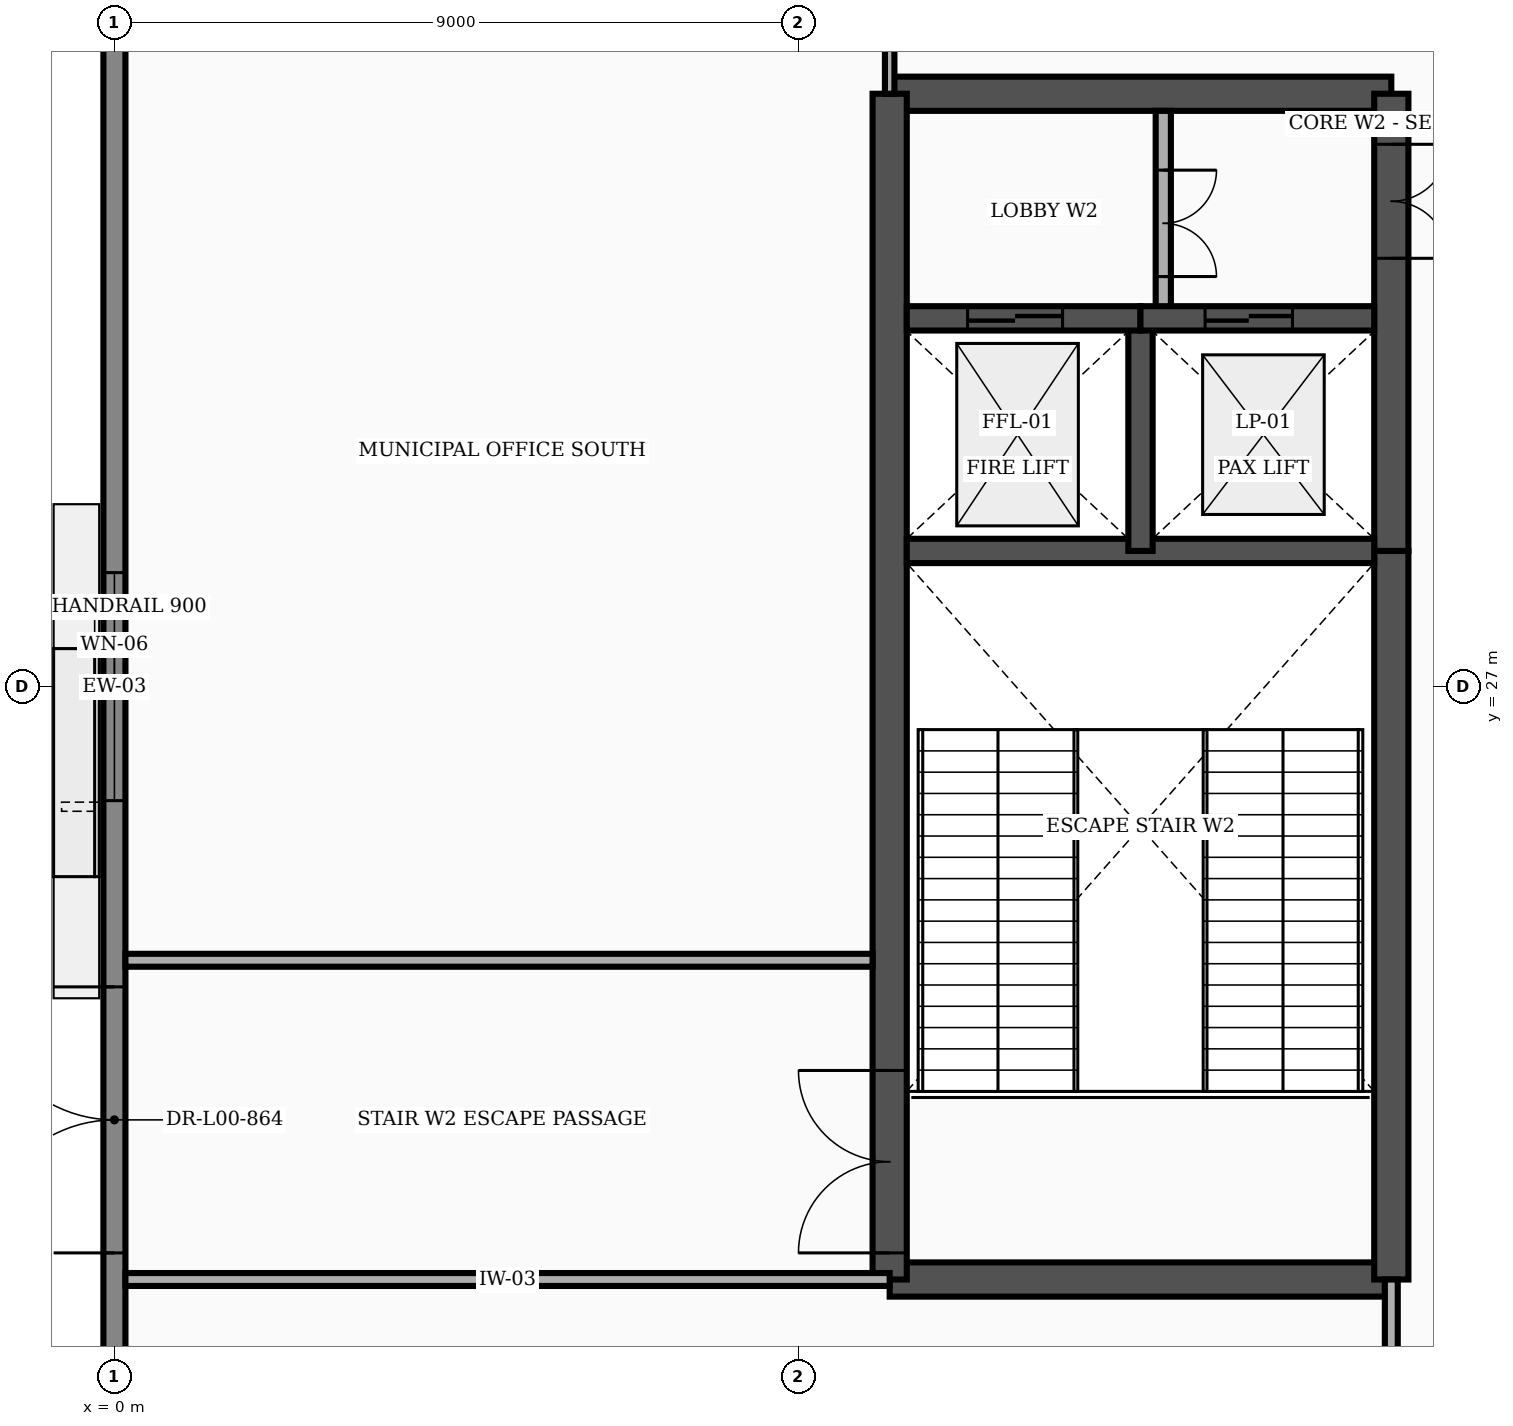
"""IFC4 building model, lengths in metres.
Left out: names, types, materials, properties, quantities, classifications, styles, units other than length and angle.
Written with IfcOpenShell. Run it as: python <this file> out.ifc"""

import sys

from ifc_helpers import new_model, si_unit, direction, frame, frame_2d, origin, place, context, subcontext, project, spatial, rectangle, extrude, element, fill, save


model = new_model("IFC4")
c1 = context("Model", 3, precision=1e-05, world=origin(), true_north=direction((0.0, 1.0)))
c2 = subcontext(c1, "Body", "Model", "MODEL_VIEW")
j1 = project(units=[si_unit("LENGTHUNIT", "METRE"), si_unit("PLANEANGLEUNIT", "RADIAN")], contexts=[c1])
p1 = place(None, origin())
s1 = spatial("IfcSite", under=j1, at=p1, CompositionType="ELEMENT")
p2 = place(p1, origin())
s2 = spatial("IfcBuilding", under=s1, at=p2, CompositionType="ELEMENT")
p3 = place(p2, origin())
s3 = spatial("IfcBuildingStorey", under=s2, at=p3, CompositionType="ELEMENT", Elevation=0.0)
p4 = place(p3, frame((0.0, 18.198, 0.0), z_axis=(0.0, 0.0, 1.0), x_axis=(0.0, 1.0, 0.0)))
e1 = element("IfcWall", 1, at=p4, inside=s3, PredefinedType="STANDARD", context=c2, shape_type="SweptSolid", body=[
    extrude(rectangle(XDim=17.603, YDim=0.29, at=frame_2d((8.802, 0.0))), origin(), (0.0, 0.0, 1.0), 5.066),
])
p5 = place(p4, frame((1.352, 0.0, 0.0)))
e2 = element("IfcOpeningElement", 2, at=p5, cuts=e1, PredefinedType="OPENING", context=c2, shape_type="SweptSolid", body=[
    extrude(rectangle(XDim=3.5, YDim=2.4, at=frame_2d((1.75, 1.2))), frame((0.0, 0.157, 0.0), z_axis=(0.0, -1.0, 0.0), x_axis=(1.0, 0.0, 0.0)), (0.0, 0.0, 1.0), 0.314),
])
p6 = place(p4, frame((7.302, 0.0, 0.85)))
e3 = element("IfcOpeningElement", 3, at=p6, cuts=e1, PredefinedType="OPENING", context=c2, shape_type="SweptSolid", body=[
    extrude(rectangle(XDim=3.0, YDim=2.6, at=frame_2d((1.5, 1.3))), frame((0.0, 0.157, 0.0), z_axis=(0.0, -1.0, 0.0), x_axis=(1.0, 0.0, 0.0)), (0.0, 0.0, 1.0), 0.314),
])
for number, where, z_axis, x_axis in (
    (4, (10.2, 19.2, 0.0), (0.0, 0.0, 1.0), (1.0, 0.0, 0.0)),
    (5, (10.2, 34.8, 0.0), (0.0, 0.0, 1.0), (1.0, 0.0, 0.0)),
):
    element("IfcWall", number, at=place(p3, frame(where, z_axis=z_axis, x_axis=x_axis)), inside=s3, PredefinedType="SHEAR", context=c2, shape_type="SweptSolid", body=[
        extrude(rectangle(XDim=6.6, YDim=0.45, at=frame_2d((3.3, 0.0))), origin(), (0.0, 0.0, 1.0), 5.75),
    ])
p7 = place(p3, frame((10.2, 19.2, 0.0), z_axis=(0.0, 0.0, 1.0), x_axis=(0.0, 1.0, 0.0)))
e6 = element("IfcWall", 6, at=p7, inside=s3, PredefinedType="SHEAR", context=c2, shape_type="SweptSolid", body=[
    extrude(rectangle(XDim=15.6, YDim=0.45, at=frame_2d((7.8, 0.0))), origin(), (0.0, 0.0, 1.0), 5.75),
])
p8 = place(p7, frame((0.35, 0.0, 0.0)))
e7 = element("IfcOpeningElement", 7, at=p8, cuts=e6, PredefinedType="OPENING", context=c2, shape_type="SweptSolid", body=[
    extrude(rectangle(XDim=2.4, YDim=2.25, at=frame_2d((1.2, 1.125))), frame((0.0, 0.237, 0.0), z_axis=(0.0, -1.0, 0.0), x_axis=(1.0, 0.0, 0.0)), (0.0, 0.0, 1.0), 0.474),
])
p9 = place(p3, frame((16.8, 19.2, 0.0), z_axis=(0.0, 0.0, 1.0), x_axis=(0.0, 1.0, 0.0)))
e8 = element("IfcWall", 8, at=p9, inside=s3, PredefinedType="SHEAR", context=c2, shape_type="SweptSolid", body=[
    extrude(rectangle(XDim=9.585, YDim=0.45, at=frame_2d((4.792, 0.0))), origin(), (0.0, 0.0, 1.0), 5.75),
])
p10 = place(p3, frame((16.8, 28.785, 0.0), z_axis=(0.0, 0.0, 1.0), x_axis=(0.0, 1.0, 0.0)))
e9 = element("IfcWall", 9, at=p10, inside=s3, PredefinedType="SHEAR", context=c2, shape_type="SweptSolid", body=[
    extrude(rectangle(XDim=6.015, YDim=0.45, at=frame_2d((3.008, 0.0))), origin(), (0.0, 0.0, 1.0), 5.75),
])
p11 = place(p10, frame((3.85, 0.0, 0.0)))
e10 = element("IfcOpeningElement", 10, at=p11, cuts=e9, PredefinedType="OPENING", context=c2, shape_type="SweptSolid", body=[
    extrude(rectangle(XDim=1.5, YDim=2.2, at=frame_2d((0.75, 1.1))), frame((0.0, 0.237, 0.0), z_axis=(0.0, -1.0, 0.0), x_axis=(1.0, 0.0, 0.0)), (0.0, 0.0, 1.0), 0.474),
])
p12 = place(p3, frame((10.425, 28.785, 0.0), z_axis=(0.0, 0.0, 1.0), x_axis=(1.0, 0.0, 0.0)))
e11 = element("IfcWall", 11, at=p12, inside=s3, PredefinedType="SHEAR", context=c2, shape_type="SweptSolid", body=[
    extrude(rectangle(XDim=6.15, YDim=0.32, at=frame_2d((3.075, 0.0))), origin(), (0.0, 0.0, 1.0), 5.75),
])
p13 = place(p3, frame((13.5, 28.785, 0.0), z_axis=(0.0, 0.0, 1.0), x_axis=(0.0, 1.0, 0.0)))
e12 = element("IfcWall", 12, at=p13, inside=s3, PredefinedType="SHEAR", context=c2, shape_type="SweptSolid", body=[
    extrude(rectangle(XDim=3.06, YDim=0.32, at=frame_2d((1.53, 0.0))), origin(), (0.0, 0.0, 1.0), 5.75),
])
p14 = place(p3, frame((13.8, 31.845, 0.0), z_axis=(0.0, 0.0, 1.0), x_axis=(0.0, 1.0, 0.0)))
e13 = element("IfcWall", 13, at=p14, inside=s3, PredefinedType="PARTITIONING", context=c2, shape_type="SweptSolid", body=[
    extrude(rectangle(XDim=2.73, YDim=0.2, at=frame_2d((1.365, 0.0))), origin(), (0.0, 0.0, 1.0), 5.75),
])
p15 = place(p14, frame((0.55, 0.0, 0.0)))
e14 = element("IfcOpeningElement", 14, at=p15, cuts=e13, PredefinedType="OPENING", context=c2, shape_type="SweptSolid", body=[
    extrude(rectangle(XDim=1.4, YDim=2.25, at=frame_2d((0.7, 1.125))), frame((0.0, 0.112, 0.0), z_axis=(0.0, -1.0, 0.0), x_axis=(1.0, 0.0, 0.0)), (0.0, 0.0, 1.0), 0.224),
])
p16 = place(p3, frame((10.425, 31.845, 0.0), z_axis=(0.0, 0.0, 1.0), x_axis=(1.0, 0.0, 0.0)))
e15 = element("IfcWall", 15, at=p16, inside=s3, PredefinedType="SHEAR", context=c2, shape_type="SweptSolid", body=[
    extrude(rectangle(XDim=3.075, YDim=0.32, at=frame_2d((1.538, 0.0))), origin(), (0.0, 0.0, 1.0), 5.75),
])
p17 = place(p16, frame((0.8, 0.0, 0.0)))
e16 = element("IfcOpeningElement", 16, at=p17, cuts=e15, PredefinedType="OPENING", context=c2, shape_type="SweptSolid", body=[
    extrude(rectangle(XDim=1.25, YDim=2.25, at=frame_2d((0.625, 1.125))), frame((0.0, 0.172, 0.0), z_axis=(0.0, -1.0, 0.0), x_axis=(1.0, 0.0, 0.0)), (0.0, 0.0, 1.0), 0.344),
])
p18 = place(p3, frame((13.5, 31.845, 0.0), z_axis=(0.0, 0.0, 1.0), x_axis=(1.0, 0.0, 0.0)))
e17 = element("IfcWall", 17, at=p18, inside=s3, PredefinedType="SHEAR", context=c2, shape_type="SweptSolid", body=[
    extrude(rectangle(XDim=3.075, YDim=0.32, at=frame_2d((1.538, 0.0))), origin(), (0.0, 0.0, 1.0), 5.75),
])
p19 = place(p18, frame((0.85, 0.0, 0.0)))
e18 = element("IfcOpeningElement", 18, at=p19, cuts=e17, PredefinedType="OPENING", context=c2, shape_type="SweptSolid", body=[
    extrude(rectangle(XDim=1.15, YDim=2.2, at=frame_2d((0.575, 1.1))), frame((0.0, 0.172, 0.0), z_axis=(0.0, -1.0, 0.0), x_axis=(1.0, 0.0, 0.0)), (0.0, 0.0, 1.0), 0.344),
])
p20 = place(p3, frame((10.2, 34.8, 0.0), z_axis=(0.0, 0.0, 1.0), x_axis=(0.0, 1.0, 0.0)))
e19 = element("IfcWall", 19, at=p20, inside=s3, PredefinedType="PARTITIONING", context=c2, shape_type="SweptSolid", body=[
    extrude(rectangle(XDim=2.0, YDim=0.125, at=frame_2d((1.0, 0.0))), origin(), (0.0, 0.0, 1.0), 5.75),
])
p21 = place(p3, frame((0.145, 19.2, 0.0), z_axis=(0.0, 0.0, 1.0), x_axis=(1.0, 0.0, 0.0)))
e20 = element("IfcWall", 20, at=p21, inside=s3, PredefinedType="PARTITIONING", context=c2, shape_type="SweptSolid", body=[
    extrude(rectangle(XDim=10.055, YDim=0.17, at=frame_2d((5.027, 0.0))), origin(), (0.0, 0.0, 1.0), 5.75),
])
p22 = place(p3, frame((16.8, 0.145, 0.0), z_axis=(0.0, 0.0, 1.0), x_axis=(0.0, 1.0, 0.0)))
e21 = element("IfcWall", 21, at=p22, inside=s3, PredefinedType="PARTITIONING", context=c2, shape_type="SweptSolid", body=[
    extrude(rectangle(XDim=19.055, YDim=0.17, at=frame_2d((9.527, 0.0))), origin(), (0.0, 0.0, 1.0), 5.75),
])
p23 = place(p22, frame((3.3, 0.0, 0.0)))
e22 = element("IfcOpeningElement", 22, at=p23, cuts=e21, PredefinedType="OPENING", context=c2, shape_type="SweptSolid", body=[
    extrude(rectangle(XDim=1.15, YDim=2.15, at=frame_2d((0.575, 1.075))), frame((0.0, 0.097, 0.0), z_axis=(0.0, -1.0, 0.0), x_axis=(1.0, 0.0, 0.0)), (0.0, 0.0, 1.0), 0.194),
])
p24 = place(p3, frame((0.145, 23.4, 0.0), z_axis=(0.0, 0.0, 1.0), x_axis=(1.0, 0.0, 0.0)))
e23 = element("IfcWall", 23, at=p24, inside=s3, PredefinedType="PARTITIONING", context=c2, shape_type="SweptSolid", body=[
    extrude(rectangle(XDim=9.83, YDim=0.17, at=frame_2d((4.915, 0.0))), origin(), (0.0, 0.0, 1.0), 5.75),
])
p25 = place(p5, origin())
e24 = element("IfcDoor", 24, at=p25, inside=s3, OperationType="DOUBLE_DOOR_SINGLE_SWING", PredefinedType="DOOR", context=c2, shape_type="SweptSolid", body=[
    extrude(rectangle(XDim=3.5, YDim=2.4, at=frame_2d((1.75, 1.2))), frame((0.0, 0.025, 0.0), z_axis=(0.0, -1.0, 0.0), x_axis=(1.0, 0.0, 0.0)), (0.0, 0.0, 1.0), 0.05),
])
fill(e2, e24)
p26 = place(p6, origin())
e25 = element("IfcWindow", 25, at=p26, inside=s3, PartitioningType="SINGLE_PANEL", PredefinedType="WINDOW", context=c2, shape_type="SweptSolid", body=[
    extrude(rectangle(XDim=3.0, YDim=2.6, at=frame_2d((1.5, 1.3))), frame((0.0, 0.03, 0.0), z_axis=(0.0, -1.0, 0.0), x_axis=(1.0, 0.0, 0.0)), (0.0, 0.0, 1.0), 0.06),
])
fill(e3, e25)
p27 = place(p8, origin())
e26 = element("IfcDoor", 26, at=p27, inside=s3, OperationType="DOUBLE_DOOR_SINGLE_SWING", PredefinedType="DOOR", context=c2, shape_type="SweptSolid", body=[
    extrude(rectangle(XDim=2.4, YDim=2.25, at=frame_2d((1.2, 1.125))), frame((0.0, 0.025, 0.0), z_axis=(0.0, -1.0, 0.0), x_axis=(1.0, 0.0, 0.0)), (0.0, 0.0, 1.0), 0.05),
])
fill(e7, e26)
p28 = place(p11, frame((1.5, 0.0, 0.0), z_axis=(0.0, 0.0, 1.0), x_axis=(-1.0, 0.0, 0.0)))
e27 = element("IfcDoor", 27, at=p28, inside=s3, OperationType="DOUBLE_DOOR_SINGLE_SWING", PredefinedType="DOOR", context=c2, shape_type="SweptSolid", body=[
    extrude(rectangle(XDim=1.5, YDim=2.2, at=frame_2d((0.75, 1.1))), frame((0.0, 0.025, 0.0), z_axis=(0.0, -1.0, 0.0), x_axis=(1.0, 0.0, 0.0)), (0.0, 0.0, 1.0), 0.05),
])
fill(e10, e27)
p29 = place(p15, frame((1.4, 0.0, 0.0), z_axis=(0.0, 0.0, 1.0), x_axis=(-1.0, 0.0, 0.0)))
e28 = element("IfcDoor", 28, at=p29, inside=s3, OperationType="DOUBLE_DOOR_SINGLE_SWING", PredefinedType="DOOR", context=c2, shape_type="SweptSolid", body=[
    extrude(rectangle(XDim=1.4, YDim=2.25, at=frame_2d((0.7, 1.125))), frame((0.0, 0.025, 0.0), z_axis=(0.0, -1.0, 0.0), x_axis=(1.0, 0.0, 0.0)), (0.0, 0.0, 1.0), 0.05),
])
fill(e14, e28)
p30 = place(p17, origin())
e29 = element("IfcDoor", 29, at=p30, inside=s3, OperationType="DOUBLE_DOOR_SLIDING", PredefinedType="DOOR", context=c2, shape_type="SweptSolid", body=[
    extrude(rectangle(XDim=1.25, YDim=2.25, at=frame_2d((0.625, 1.125))), frame((0.0, 0.025, 0.0), z_axis=(0.0, -1.0, 0.0), x_axis=(1.0, 0.0, 0.0)), (0.0, 0.0, 1.0), 0.05),
])
fill(e16, e29)
p31 = place(p19, origin())
e30 = element("IfcDoor", 30, at=p31, inside=s3, OperationType="DOUBLE_DOOR_SLIDING", PredefinedType="DOOR", context=c2, shape_type="SweptSolid", body=[
    extrude(rectangle(XDim=1.15, YDim=2.2, at=frame_2d((0.575, 1.1))), frame((0.0, 0.025, 0.0), z_axis=(0.0, -1.0, 0.0), x_axis=(1.0, 0.0, 0.0)), (0.0, 0.0, 1.0), 0.05),
])
fill(e18, e30)
save(model, sys.argv[1])
